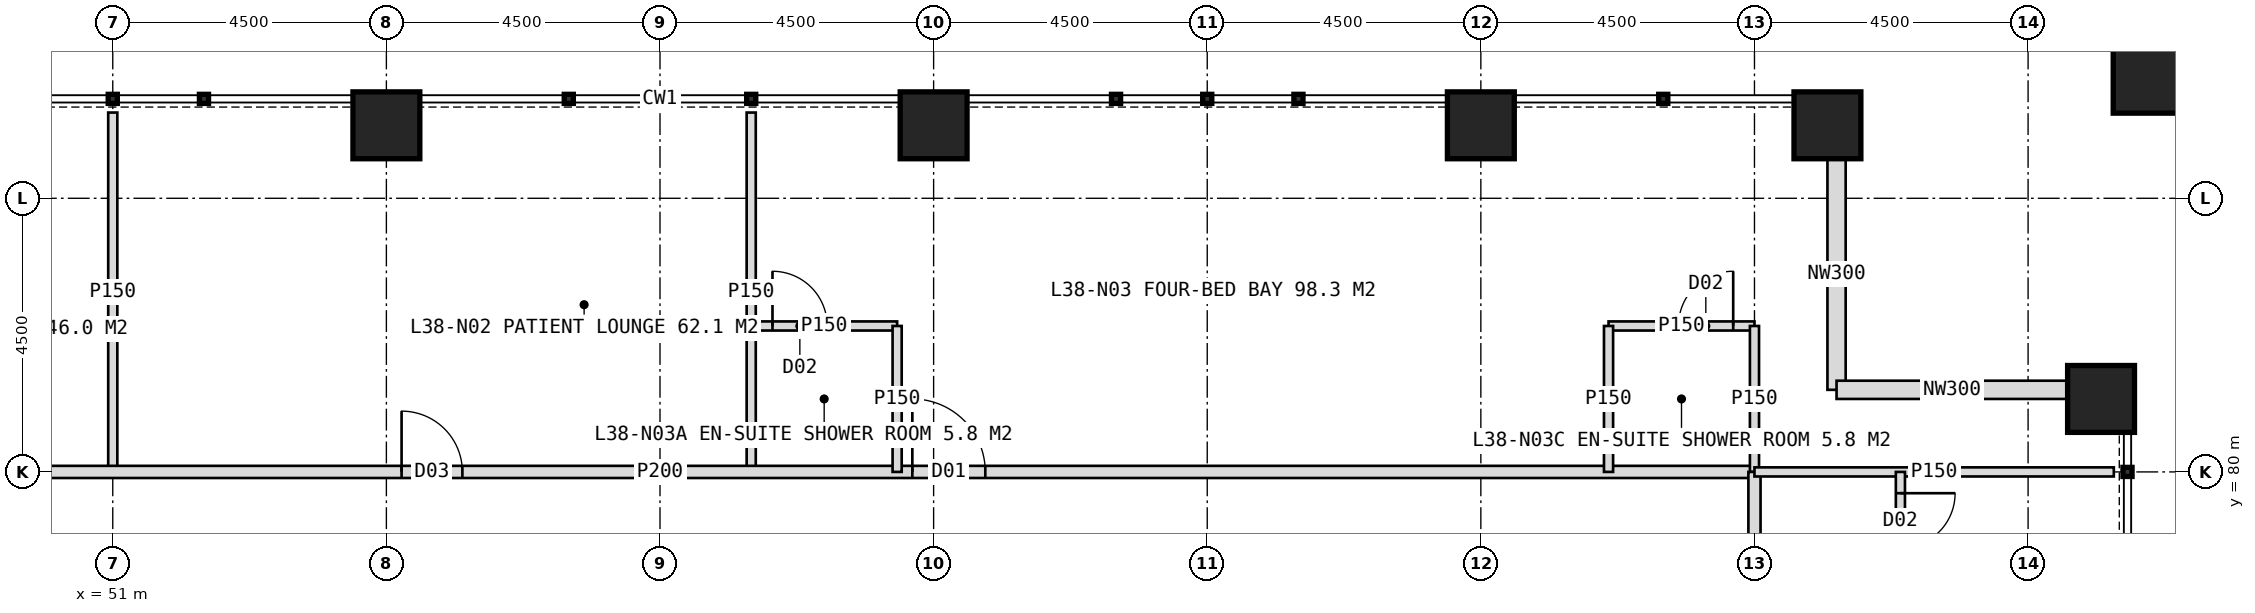
"""IFC4 building model, lengths in metres.
Left out: names, types, materials, properties, quantities, classifications, styles, units other than length and angle.
Written with IfcOpenShell. Run it as: python <this file> out.ifc"""

import sys

from ifc_helpers import new_model, si_unit, direction, frame, frame_2d, origin, origin_2d, place, context, subcontext, project, spatial, rectangle, hollow_rectangle, extrude, element, fill, save


model = new_model("IFC4")
c1 = context("Model", 3, precision=1e-05, world=origin(), true_north=direction((0.0, 1.0)))
c2 = subcontext(c1, "Body", "Model", "MODEL_VIEW")
j1 = project(units=[si_unit("LENGTHUNIT", "METRE"), si_unit("PLANEANGLEUNIT", "RADIAN")], contexts=[c1])
p1 = place(None, origin())
s1 = spatial("IfcSite", under=j1, at=p1, CompositionType="ELEMENT")
p2 = place(p1, origin())
s2 = spatial("IfcBuilding", under=s1, at=p2, CompositionType="ELEMENT")
p3 = place(p2, frame((0.0, 0.0, 160.0)))
s3 = spatial("IfcBuildingStorey", under=s2, at=p3, CompositionType="ELEMENT", Elevation=160.0)
for number, where, z_axis, x_axis in (
    (1, (55.5, 85.7, 0.0), (0.0, 0.0, 1.0), (1.0, 0.0, 0.0)),
    (2, (64.5, 85.7, 0.0), (0.0, 0.0, 1.0), (1.0, 0.0, 0.0)),
    (3, (73.5, 85.7, 0.0), (0.0, 0.0, 1.0), (1.0, 0.0, 0.0)),
    (4, (79.2, 85.7, 0.0), (0.0, 0.0, 1.0), (1.0, 0.0, 0.0)),
    (5, (83.7, 81.2, 0.0), (0.0, 0.0, 1.0), (1.0, 0.0, 0.0)),
):
    element("IfcColumn", number, at=place(p3, frame(where, z_axis=z_axis, x_axis=x_axis)), inside=s3, PredefinedType="COLUMN", context=c2, shape_type="SweptSolid", body=[
        extrude(hollow_rectangle(XDim=1.1, YDim=1.1, WallThickness=0.1, at=origin_2d()), origin(), (0.0, 0.0, 1.0), 4.0),
    ])
p4 = place(p3, frame((84.6, 86.6, 0.0), z_axis=(0.0, 0.0, 1.0), x_axis=(1.0, 0.0, 0.0)))
e6 = element("IfcColumn", 6, at=p4, inside=s3, PredefinedType="COLUMN", context=c2, shape_type="SweptSolid", body=[
    extrude(hollow_rectangle(XDim=1.4, YDim=1.4, WallThickness=0.08, at=origin_2d()), origin(), (0.0, 0.0, 1.0), 4.0),
])
for number, where, z_axis, x_axis in (
    (7, (79.35, 85.15, 0.0), (0.0, 0.0, 1.0), (0.0, -1.0, 0.0)),
    (8, (79.35, 81.35, 0.0), (0.0, 0.0, 1.0), (1.0, 0.0, 0.0)),
):
    element("IfcWall", number, at=place(p3, frame(where, z_axis=z_axis, x_axis=x_axis)), inside=s3, PredefinedType="ELEMENTEDWALL", context=c2, shape_type="SweptSolid", body=[
        extrude(rectangle(XDim=3.8, YDim=0.3, at=frame_2d((1.9, 0.0))), origin(), (0.0, 0.0, 1.0), 4.0),
    ])
for number, where, z_axis, x_axis in (
    (9, (51.0, 80.0, 0.0), (0.0, 0.0, 1.0), (0.0, 1.0, 0.0)),
    (10, (61.5, 80.0, 0.0), (0.0, 0.0, 1.0), (0.0, 1.0, 0.0)),
):
    element("IfcWall", number, at=place(p3, frame(where, z_axis=z_axis, x_axis=x_axis)), inside=s3, PredefinedType="PARTITIONING", context=c2, shape_type="SweptSolid", body=[
        extrude(rectangle(XDim=5.91, YDim=0.15, at=frame_2d((2.955, 0.0))), origin(), (0.0, 0.0, 1.0), 3.75),
    ])
p5 = place(p3, frame((42.0, 80.0, 0.0), z_axis=(0.0, 0.0, 1.0), x_axis=(1.0, 0.0, 0.0)))
e11 = element("IfcWall", 11, at=p5, inside=s3, PredefinedType="PARTITIONING", context=c2, shape_type="SweptSolid", body=[
    extrude(rectangle(XDim=36.0, YDim=0.2, at=frame_2d((18.0, 0.0))), origin(), (0.0, 0.0, 1.0), 3.75),
])
p6 = place(p5, frame((3.25, 0.0, 0.0)))
e12 = element("IfcOpeningElement", 12, at=p6, cuts=e11, PredefinedType="OPENING", context=c2, shape_type="SweptSolid", body=[
    extrude(rectangle(XDim=1.2, YDim=2.2, at=frame_2d((0.6, 1.1))), frame((0.0, 0.11, 0.0), z_axis=(0.0, -1.0, 0.0), x_axis=(1.0, 0.0, 0.0)), (0.0, 0.0, 1.0), 0.22),
])
p7 = place(p5, frame((13.75, 0.0, 0.0)))
e13 = element("IfcOpeningElement", 13, at=p7, cuts=e11, PredefinedType="OPENING", context=c2, shape_type="SweptSolid", body=[
    extrude(rectangle(XDim=1.0, YDim=2.1, at=frame_2d((0.5, 1.05))), frame((0.0, 0.11, 0.0), z_axis=(0.0, -1.0, 0.0), x_axis=(1.0, 0.0, 0.0)), (0.0, 0.0, 1.0), 0.22),
])
p8 = place(p5, frame((22.15, 0.0, 0.0)))
e14 = element("IfcOpeningElement", 14, at=p8, cuts=e11, PredefinedType="OPENING", context=c2, shape_type="SweptSolid", body=[
    extrude(rectangle(XDim=1.2, YDim=2.2, at=frame_2d((0.6, 1.1))), frame((0.0, 0.11, 0.0), z_axis=(0.0, -1.0, 0.0), x_axis=(1.0, 0.0, 0.0)), (0.0, 0.0, 1.0), 0.22),
])
p9 = place(p3, frame((61.5, 82.4, 0.0), z_axis=(0.0, 0.0, 1.0), x_axis=(1.0, 0.0, 0.0)))
e15 = element("IfcWall", 15, at=p9, inside=s3, PredefinedType="PARTITIONING", context=c2, shape_type="SweptSolid", body=[
    extrude(rectangle(XDim=2.4, YDim=0.15, at=frame_2d((1.2, 0.0))), origin(), (0.0, 0.0, 1.0), 3.75),
])
p10 = place(p9, frame((0.35, 0.0, 0.0)))
e16 = element("IfcOpeningElement", 16, at=p10, cuts=e15, PredefinedType="OPENING", context=c2, shape_type="SweptSolid", body=[
    extrude(rectangle(XDim=0.9, YDim=2.1, at=frame_2d((0.45, 1.05))), frame((0.0, 0.085, 0.0), z_axis=(0.0, -1.0, 0.0), x_axis=(1.0, 0.0, 0.0)), (0.0, 0.0, 1.0), 0.17),
])
p11 = place(p3, frame((63.9, 80.0, 0.0), z_axis=(0.0, 0.0, 1.0), x_axis=(0.0, 1.0, 0.0)))
e17 = element("IfcWall", 17, at=p11, inside=s3, PredefinedType="PARTITIONING", context=c2, shape_type="SweptSolid", body=[
    extrude(rectangle(XDim=2.4, YDim=0.15, at=frame_2d((1.2, 0.0))), origin(), (0.0, 0.0, 1.0), 3.75),
])
p12 = place(p3, frame((75.6, 82.4, 0.0), z_axis=(0.0, 0.0, 1.0), x_axis=(1.0, 0.0, 0.0)))
e18 = element("IfcWall", 18, at=p12, inside=s3, PredefinedType="PARTITIONING", context=c2, shape_type="SweptSolid", body=[
    extrude(rectangle(XDim=2.4, YDim=0.15, at=frame_2d((1.2, 0.0))), origin(), (0.0, 0.0, 1.0), 3.75),
])
p13 = place(p12, frame((1.15, 0.0, 0.0)))
e19 = element("IfcOpeningElement", 19, at=p13, cuts=e18, PredefinedType="OPENING", context=c2, shape_type="SweptSolid", body=[
    extrude(rectangle(XDim=0.9, YDim=2.1, at=frame_2d((0.45, 1.05))), frame((0.0, 0.085, 0.0), z_axis=(0.0, -1.0, 0.0), x_axis=(1.0, 0.0, 0.0)), (0.0, 0.0, 1.0), 0.17),
])
for number, where, z_axis, x_axis in (
    (20, (75.6, 80.0, 0.0), (0.0, 0.0, 1.0), (0.0, 1.0, 0.0)),
    (21, (78.0, 80.0, 0.0), (0.0, 0.0, 1.0), (0.0, 1.0, 0.0)),
):
    element("IfcWall", number, at=place(p3, frame(where, z_axis=z_axis, x_axis=x_axis)), inside=s3, PredefinedType="PARTITIONING", context=c2, shape_type="SweptSolid", body=[
        extrude(rectangle(XDim=2.4, YDim=0.15, at=frame_2d((1.2, 0.0))), origin(), (0.0, 0.0, 1.0), 3.75),
    ])
p14 = place(p3, frame((78.0, 80.0, 0.0), z_axis=(0.0, 0.0, 1.0), x_axis=(0.0, -1.0, 0.0)))
e22 = element("IfcWall", 22, at=p14, inside=s3, PredefinedType="PARTITIONING", context=c2, shape_type="SweptSolid", body=[
    extrude(rectangle(XDim=36.0, YDim=0.2, at=frame_2d((18.0, 0.0))), origin(), (0.0, 0.0, 1.0), 3.75),
])
p15 = place(p14, frame((3.25, 0.0, 0.0)))
e23 = element("IfcOpeningElement", 23, at=p15, cuts=e22, PredefinedType="OPENING", context=c2, shape_type="SweptSolid", body=[
    extrude(rectangle(XDim=1.2, YDim=2.2, at=frame_2d((0.6, 1.1))), frame((0.0, 0.11, 0.0), z_axis=(0.0, -1.0, 0.0), x_axis=(1.0, 0.0, 0.0)), (0.0, 0.0, 1.0), 0.22),
])
p16 = place(p14, frame((10.75, 0.0, 0.0)))
e24 = element("IfcOpeningElement", 24, at=p16, cuts=e22, PredefinedType="OPENING", context=c2, shape_type="SweptSolid", body=[
    extrude(rectangle(XDim=1.2, YDim=2.2, at=frame_2d((0.6, 1.1))), frame((0.0, 0.11, 0.0), z_axis=(0.0, -1.0, 0.0), x_axis=(1.0, 0.0, 0.0)), (0.0, 0.0, 1.0), 0.22),
])
p17 = place(p14, frame((21.25, 0.0, 0.0)))
e25 = element("IfcOpeningElement", 25, at=p17, cuts=e22, PredefinedType="OPENING", context=c2, shape_type="SweptSolid", body=[
    extrude(rectangle(XDim=1.2, YDim=2.2, at=frame_2d((0.6, 1.1))), frame((0.0, 0.11, 0.0), z_axis=(0.0, -1.0, 0.0), x_axis=(1.0, 0.0, 0.0)), (0.0, 0.0, 1.0), 0.22),
])
p18 = place(p14, frame((31.75, 0.0, 0.0)))
e26 = element("IfcOpeningElement", 26, at=p18, cuts=e22, PredefinedType="OPENING", context=c2, shape_type="SweptSolid", body=[
    extrude(rectangle(XDim=1.2, YDim=2.2, at=frame_2d((0.6, 1.1))), frame((0.0, 0.11, 0.0), z_axis=(0.0, -1.0, 0.0), x_axis=(1.0, 0.0, 0.0)), (0.0, 0.0, 1.0), 0.22),
])
p19 = place(p3, frame((78.0, 80.0, 0.0), z_axis=(0.0, 0.0, 1.0), x_axis=(1.0, 0.0, 0.0)))
e27 = element("IfcWall", 27, at=p19, inside=s3, PredefinedType="PARTITIONING", context=c2, shape_type="SweptSolid", body=[
    extrude(rectangle(XDim=5.91, YDim=0.15, at=frame_2d((2.955, 0.0))), origin(), (0.0, 0.0, 1.0), 3.75),
])
p20 = place(p3, frame((80.4, 80.0, 0.0), z_axis=(0.0, 0.0, 1.0), x_axis=(0.0, -1.0, 0.0)))
e28 = element("IfcWall", 28, at=p20, inside=s3, PredefinedType="PARTITIONING", context=c2, shape_type="SweptSolid", body=[
    extrude(rectangle(XDim=3.0, YDim=0.15, at=frame_2d((1.5, 0.0))), origin(), (0.0, 0.0, 1.0), 3.75),
])
p21 = place(p20, frame((0.35, 0.0, 0.0)))
e29 = element("IfcOpeningElement", 29, at=p21, cuts=e28, PredefinedType="OPENING", context=c2, shape_type="SweptSolid", body=[
    extrude(rectangle(XDim=0.9, YDim=2.1, at=frame_2d((0.45, 1.05))), frame((0.0, 0.085, 0.0), z_axis=(0.0, -1.0, 0.0), x_axis=(1.0, 0.0, 0.0)), (0.0, 0.0, 1.0), 0.17),
])
p22 = place(p7, origin())
e30 = element("IfcDoor", 30, at=p22, inside=s3, OperationType="SINGLE_SWING_LEFT", PredefinedType="DOOR", context=c2, shape_type="SweptSolid", body=[
    extrude(rectangle(XDim=1.0, YDim=2.1, at=frame_2d((0.5, 1.05))), frame((0.0, 0.025, 0.0), z_axis=(0.0, -1.0, 0.0), x_axis=(1.0, 0.0, 0.0)), (0.0, 0.0, 1.0), 0.05),
])
fill(e13, e30)
p23 = place(p8, origin())
e31 = element("IfcDoor", 31, at=p23, inside=s3, OperationType="SINGLE_SWING_LEFT", PredefinedType="DOOR", context=c2, shape_type="SweptSolid", body=[
    extrude(rectangle(XDim=1.2, YDim=2.2, at=frame_2d((0.6, 1.1))), frame((0.0, 0.025, 0.0), z_axis=(0.0, -1.0, 0.0), x_axis=(1.0, 0.0, 0.0)), (0.0, 0.0, 1.0), 0.05),
])
fill(e14, e31)
p24 = place(p10, origin())
e32 = element("IfcDoor", 32, at=p24, inside=s3, OperationType="SINGLE_SWING_LEFT", PredefinedType="DOOR", context=c2, shape_type="SweptSolid", body=[
    extrude(rectangle(XDim=0.9, YDim=2.1, at=frame_2d((0.45, 1.05))), frame((0.0, 0.025, 0.0), z_axis=(0.0, -1.0, 0.0), x_axis=(1.0, 0.0, 0.0)), (0.0, 0.0, 1.0), 0.05),
])
fill(e16, e32)
p25 = place(p13, origin())
e33 = element("IfcDoor", 33, at=p25, inside=s3, OperationType="SINGLE_SWING_RIGHT", PredefinedType="DOOR", context=c2, shape_type="SweptSolid", body=[
    extrude(rectangle(XDim=0.9, YDim=2.1, at=frame_2d((0.45, 1.05))), frame((0.0, 0.025, 0.0), z_axis=(0.0, -1.0, 0.0), x_axis=(1.0, 0.0, 0.0)), (0.0, 0.0, 1.0), 0.05),
])
fill(e19, e33)
p26 = place(p21, origin())
e34 = element("IfcDoor", 34, at=p26, inside=s3, OperationType="SINGLE_SWING_LEFT", PredefinedType="DOOR", context=c2, shape_type="SweptSolid", body=[
    extrude(rectangle(XDim=0.9, YDim=2.1, at=frame_2d((0.45, 1.05))), frame((0.0, 0.025, 0.0), z_axis=(0.0, -1.0, 0.0), x_axis=(1.0, 0.0, 0.0)), (0.0, 0.0, 1.0), 0.05),
])
fill(e29, e34)
save(model, sys.argv[1])
